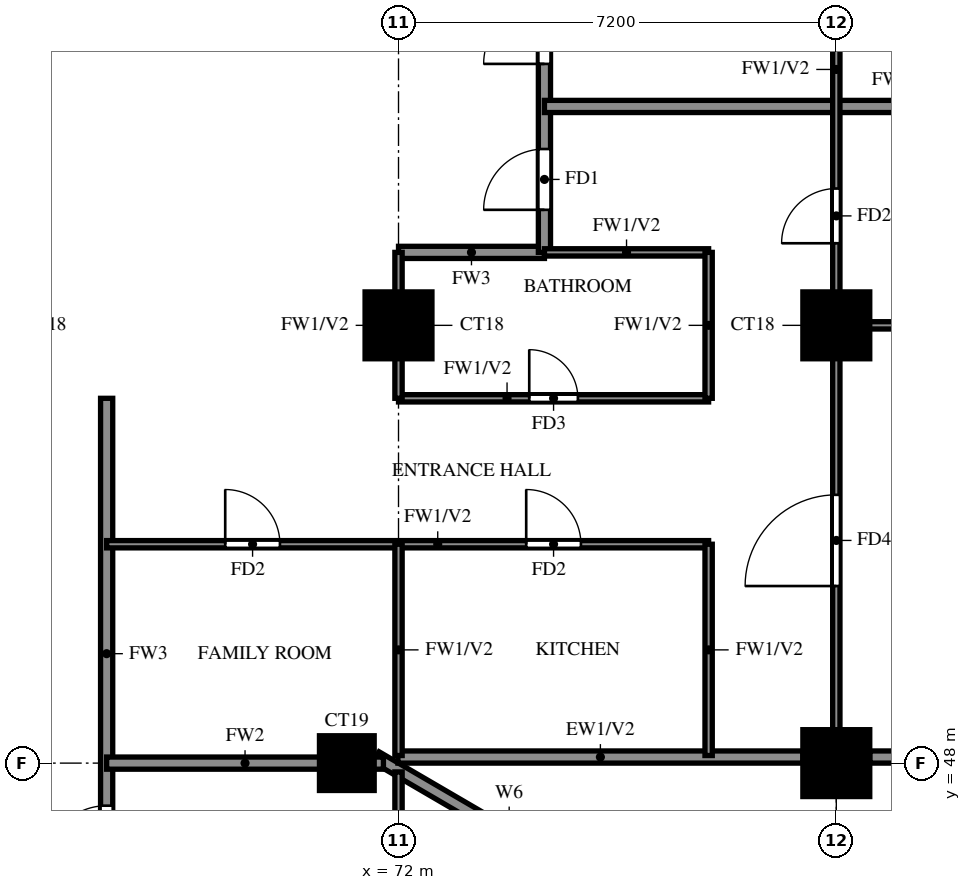
"""IFC4 building model, lengths in metres.
Left out: names, types, materials, properties, quantities, classifications, styles, units other than length and angle.
Written with IfcOpenShell. Run it as: python <this file> out.ifc"""

import sys

from ifc_helpers import new_model, si_unit, direction, frame, frame_2d, origin, origin_2d, place, context, subcontext, project, spatial, rectangle, extrude, source, transform, mapped, element, fill, save


model = new_model("IFC4")
c1 = context("Model", 3, precision=1e-05, world=origin(), true_north=direction((0.0, 1.0)))
c2 = subcontext(c1, "Body", "Model", "MODEL_VIEW")
j1 = project(units=[si_unit("LENGTHUNIT", "METRE"), si_unit("PLANEANGLEUNIT", "RADIAN")], contexts=[c1])
p1 = place(None, origin())
s1 = spatial("IfcSite", under=j1, at=p1, CompositionType="ELEMENT")
p2 = place(p1, origin())
s2 = spatial("IfcBuilding", under=s1, at=p2, CompositionType="ELEMENT")
p3 = place(p2, frame((0.0, 0.0, 127.0)))
s3 = spatial("IfcBuildingStorey", under=s2, at=p3, CompositionType="ELEMENT", Elevation=127.0)
m1 = source(origin(), c2, "Body", "SweptSolid", [
    extrude(rectangle(XDim=0.9, YDim=0.9, at=origin_2d()), origin(), (0.0, 0.0, 1.0), 3.2),
])
p4 = place(p3, frame((71.15, 48.0, 0.0), z_axis=(0.0, 0.0, 1.0), x_axis=(1.0, 0.0, 0.0)))
e1 = element("IfcColumn", 1, at=p4, inside=s3, PredefinedType="COLUMN", context=c2, shape_type="MappedRepresentation", body=[
    mapped(m1, transform((0.0, 0.0, 0.0))),
])
m2 = source(origin(), c2, "Body", "SweptSolid", [
    extrude(rectangle(XDim=1.1, YDim=1.1, at=origin_2d()), origin(), (0.0, 0.0, 1.0), 3.2),
])
for number, where, z_axis, x_axis in (
    (2, (79.2, 48.0, 0.0), (0.0, 0.0, 1.0), (1.0, 0.0, 0.0)),
    (3, (72.0, 55.2, 0.0), (0.0, 0.0, 1.0), (1.0, 0.0, 0.0)),
    (4, (79.2, 55.2, 0.0), (0.0, 0.0, 1.0), (1.0, 0.0, 0.0)),
):
    element("IfcColumn", number, at=place(p3, frame(where, z_axis=z_axis, x_axis=x_axis)), inside=s3, PredefinedType="COLUMN", context=c2, shape_type="MappedRepresentation", body=[
        mapped(m2, transform((0.0, 0.0, 0.0))),
    ])
p5 = place(p3, frame((85.719, 39.881, 0.0), z_axis=(0.0, 0.0, 1.0), x_axis=(-0.86377618652, 0.503875678716, 0.0)))
e5 = element("IfcWall", 5, at=p5, inside=s3, PredefinedType="SOLIDWALL", context=c2, shape_type="SweptSolid", body=[
    extrude(rectangle(XDim=16.311, YDim=0.2, at=frame_2d((8.156, 0.0))), origin(), (0.0, 0.0, 1.0), 3.2),
])
p6 = place(p5, frame((13.326, 0.0, 1.5)))
e6 = element("IfcOpeningElement", 6, at=p6, cuts=e5, PredefinedType="OPENING", context=c2, shape_type="SweptSolid", body=[
    extrude(rectangle(XDim=0.9, YDim=0.9, at=frame_2d((0.45, 0.45))), frame((0.0, 0.11, 0.0), z_axis=(0.0, -1.0, 0.0), x_axis=(1.0, 0.0, 0.0)), (0.0, 0.0, 1.0), 0.22),
])
p7 = place(p3, frame((71.99, 48.1, 0.0), z_axis=(0.0, 0.0, 1.0), x_axis=(1.0, 0.0, 0.0)))
e7 = element("IfcWall", 7, at=p7, inside=s3, PredefinedType="SOLIDWALL", context=c2, shape_type="SweptSolid", body=[
    extrude(rectangle(XDim=6.66, YDim=0.2, at=frame_2d((3.33, 0.0))), origin(), (0.0, 0.0, 1.0), 3.2),
])
p8 = place(p3, frame((79.75, 48.1, 0.0), z_axis=(0.0, 0.0, 1.0), x_axis=(1.0, 0.0, 0.0)))
e8 = element("IfcWall", 8, at=p8, inside=s3, PredefinedType="SOLIDWALL", context=c2, shape_type="SweptSolid", body=[
    extrude(rectangle(XDim=5.6, YDim=0.2, at=frame_2d((2.8, 0.0))), origin(), (0.0, 0.0, 1.0), 3.2),
])
p9 = place(p8, frame((1.6, 0.0, 0.6)))
e9 = element("IfcOpeningElement", 9, at=p9, cuts=e8, PredefinedType="OPENING", context=c2, shape_type="SweptSolid", body=[
    extrude(rectangle(XDim=2.4, YDim=2.4, at=frame_2d((1.2, 1.2))), frame((0.0, 0.11, 0.0), z_axis=(0.0, -1.0, 0.0), x_axis=(1.0, 0.0, 0.0)), (0.0, 0.0, 1.0), 0.22),
])
p10 = place(p3, frame((72.0, 56.4, 0.0), z_axis=(0.0, 0.0, 1.0), x_axis=(1.0, 0.0, 0.0)))
e10 = element("IfcWall", 10, at=p10, inside=s3, PredefinedType="SOLIDWALL", context=c2, shape_type="SweptSolid", body=[
    extrude(rectangle(XDim=2.4, YDim=0.2, at=frame_2d((1.2, 0.0))), origin(), (0.0, 0.0, 1.0), 3.2),
])
p11 = place(p3, frame((67.2, 45.6, 0.0), z_axis=(0.0, 0.0, 1.0), x_axis=(0.0, 1.0, 0.0)))
e11 = element("IfcWall", 11, at=p11, inside=s3, PredefinedType="SOLIDWALL", context=c2, shape_type="SweptSolid", body=[
    extrude(rectangle(XDim=8.4, YDim=0.2, at=frame_2d((4.2, 0.0))), origin(), (0.0, 0.0, 1.0), 3.2),
])
p12 = place(p11, frame((0.7, 0.0, 0.0)))
e12 = element("IfcOpeningElement", 12, at=p12, cuts=e11, PredefinedType="OPENING", context=c2, shape_type="SweptSolid", body=[
    extrude(rectangle(XDim=1.0, YDim=2.1, at=frame_2d((0.5, 1.05))), frame((0.0, 0.11, 0.0), z_axis=(0.0, -1.0, 0.0), x_axis=(1.0, 0.0, 0.0)), (0.0, 0.0, 1.0), 0.22),
])
p13 = place(p3, frame((74.4, 56.4, 0.0), z_axis=(0.0, 0.0, 1.0), x_axis=(0.0, 1.0, 0.0)))
e13 = element("IfcWall", 13, at=p13, inside=s3, PredefinedType="SOLIDWALL", context=c2, shape_type="SweptSolid", body=[
    extrude(rectangle(XDim=9.6, YDim=0.2, at=frame_2d((4.8, 0.0))), origin(), (0.0, 0.0, 1.0), 3.2),
])
p14 = place(p13, frame((0.7, 0.0, 0.0)))
e14 = element("IfcOpeningElement", 14, at=p14, cuts=e13, PredefinedType="OPENING", context=c2, shape_type="SweptSolid", body=[
    extrude(rectangle(XDim=1.0, YDim=2.1, at=frame_2d((0.5, 1.05))), frame((0.0, 0.11, 0.0), z_axis=(0.0, -1.0, 0.0), x_axis=(1.0, 0.0, 0.0)), (0.0, 0.0, 1.0), 0.22),
])
p15 = place(p13, frame((3.1, 0.0, 0.0)))
e15 = element("IfcOpeningElement", 15, at=p15, cuts=e13, PredefinedType="OPENING", context=c2, shape_type="SweptSolid", body=[
    extrude(rectangle(XDim=1.0, YDim=2.1, at=frame_2d((0.5, 1.05))), frame((0.0, 0.11, 0.0), z_axis=(0.0, -1.0, 0.0), x_axis=(1.0, 0.0, 0.0)), (0.0, 0.0, 1.0), 0.22),
])
p16 = place(p3, frame((67.2, 48.0, 0.0), z_axis=(0.0, 0.0, 1.0), x_axis=(1.0, 0.0, 0.0)))
e16 = element("IfcWall", 16, at=p16, inside=s3, PredefinedType="SOLIDWALL", context=c2, shape_type="SweptSolid", body=[
    extrude(rectangle(XDim=4.552, YDim=0.2, at=frame_2d((2.276, 0.0))), origin(), (0.0, 0.0, 1.0), 3.2),
])
p17 = place(p3, frame((74.4, 58.8, 0.0), z_axis=(0.0, 0.0, 1.0), x_axis=(1.0, 0.0, 0.0)))
e17 = element("IfcWall", 17, at=p17, inside=s3, PredefinedType="SOLIDWALL", context=c2, shape_type="SweptSolid", body=[
    extrude(rectangle(XDim=11.875, YDim=0.2, at=frame_2d((5.938, 0.0))), origin(), (0.0, 0.0, 1.0), 2.3),
])
p18 = place(p3, frame((67.2, 51.6, 0.0), z_axis=(0.0, 0.0, 1.0), x_axis=(1.0, 0.0, 0.0)))
e18 = element("IfcWall", 18, at=p18, inside=s3, PredefinedType="PARTITIONING", context=c2, shape_type="SweptSolid", body=[
    extrude(rectangle(XDim=9.9, YDim=0.12, at=frame_2d((4.95, 0.0))), origin(), (0.0, 0.0, 1.0), 3.2),
])
p19 = place(p18, frame((6.9, 0.0, 0.0)))
e19 = element("IfcOpeningElement", 19, at=p19, cuts=e18, PredefinedType="OPENING", context=c2, shape_type="SweptSolid", body=[
    extrude(rectangle(XDim=0.9, YDim=2.1, at=frame_2d((0.45, 1.05))), frame((0.0, 0.07, 0.0), z_axis=(0.0, -1.0, 0.0), x_axis=(1.0, 0.0, 0.0)), (0.0, 0.0, 1.0), 0.14),
])
p20 = place(p18, frame((1.95, 0.0, 0.0)))
e20 = element("IfcOpeningElement", 20, at=p20, cuts=e18, PredefinedType="OPENING", context=c2, shape_type="SweptSolid", body=[
    extrude(rectangle(XDim=0.9, YDim=2.1, at=frame_2d((0.45, 1.05))), frame((0.0, 0.07, 0.0), z_axis=(0.0, -1.0, 0.0), x_axis=(1.0, 0.0, 0.0)), (0.0, 0.0, 1.0), 0.14),
])
p21 = place(p3, frame((72.0, 54.0, 0.0), z_axis=(0.0, 0.0, 1.0), x_axis=(1.0, 0.0, 0.0)))
e21 = element("IfcWall", 21, at=p21, inside=s3, PredefinedType="PARTITIONING", context=c2, shape_type="SweptSolid", body=[
    extrude(rectangle(XDim=5.1, YDim=0.12, at=frame_2d((2.55, 0.0))), origin(), (0.0, 0.0, 1.0), 3.2),
])
p22 = place(p21, frame((2.15, 0.0, 0.0)))
e22 = element("IfcOpeningElement", 22, at=p22, cuts=e21, PredefinedType="OPENING", context=c2, shape_type="SweptSolid", body=[
    extrude(rectangle(XDim=0.8, YDim=2.1, at=frame_2d((0.4, 1.05))), frame((0.0, 0.07, 0.0), z_axis=(0.0, -1.0, 0.0), x_axis=(1.0, 0.0, 0.0)), (0.0, 0.0, 1.0), 0.14),
])
p23 = place(p3, frame((79.2, 55.2, 0.0), z_axis=(0.0, 0.0, 1.0), x_axis=(1.0, 0.0, 0.0)))
e23 = element("IfcWall", 23, at=p23, inside=s3, PredefinedType="PARTITIONING", context=c2, shape_type="SweptSolid", body=[
    extrude(rectangle(XDim=7.075, YDim=0.12, at=frame_2d((3.538, 0.0))), origin(), (0.0, 0.0, 1.0), 3.2),
])
p24 = place(p3, frame((74.4, 56.4, 0.0), z_axis=(0.0, 0.0, 1.0), x_axis=(1.0, 0.0, 0.0)))
e24 = element("IfcWall", 24, at=p24, inside=s3, PredefinedType="PARTITIONING", context=c2, shape_type="SweptSolid", body=[
    extrude(rectangle(XDim=2.7, YDim=0.12, at=frame_2d((1.35, 0.0))), origin(), (0.0, 0.0, 1.0), 3.2),
])
p25 = place(p3, frame((72.0, 39.725, 0.0), z_axis=(0.0, 0.0, 1.0), x_axis=(0.0, 1.0, 0.0)))
e25 = element("IfcWall", 25, at=p25, inside=s3, PredefinedType="PARTITIONING", context=c2, shape_type="SweptSolid", body=[
    extrude(rectangle(XDim=8.13, YDim=0.12, at=frame_2d((4.065, 0.0))), origin(), (0.0, 0.0, 1.0), 2.3),
])
p26 = place(p25, frame((1.788, 0.0, 0.0)))
e26 = element("IfcOpeningElement", 26, at=p26, cuts=e25, PredefinedType="OPENING", context=c2, shape_type="SweptSolid", body=[
    extrude(rectangle(XDim=0.9, YDim=2.1, at=frame_2d((0.45, 1.05))), frame((0.0, 0.07, 0.0), z_axis=(0.0, -1.0, 0.0), x_axis=(1.0, 0.0, 0.0)), (0.0, 0.0, 1.0), 0.14),
])
p27 = place(p25, frame((4.575, 0.0, 0.0)))
e27 = element("IfcOpeningElement", 27, at=p27, cuts=e25, PredefinedType="OPENING", context=c2, shape_type="SweptSolid", body=[
    extrude(rectangle(XDim=0.8, YDim=2.1, at=frame_2d((0.4, 1.05))), frame((0.0, 0.07, 0.0), z_axis=(0.0, -1.0, 0.0), x_axis=(1.0, 0.0, 0.0)), (0.0, 0.0, 1.0), 0.14),
])
p28 = place(p3, frame((72.0, 48.125, 0.0), z_axis=(0.0, 0.0, 1.0), x_axis=(0.0, 1.0, 0.0)))
e28 = element("IfcWall", 28, at=p28, inside=s3, PredefinedType="PARTITIONING", context=c2, shape_type="SweptSolid", body=[
    extrude(rectangle(XDim=3.475, YDim=0.12, at=frame_2d((1.738, 0.0))), origin(), (0.0, 0.0, 1.0), 3.2),
])
p29 = place(p3, frame((72.0, 54.0, 0.0), z_axis=(0.0, 0.0, 1.0), x_axis=(0.0, 1.0, 0.0)))
e29 = element("IfcWall", 29, at=p29, inside=s3, PredefinedType="PARTITIONING", context=c2, shape_type="SweptSolid", body=[
    extrude(rectangle(XDim=2.4, YDim=0.12, at=frame_2d((1.2, 0.0))), origin(), (0.0, 0.0, 1.0), 3.2),
])
p30 = place(p3, frame((77.1, 48.125, 0.0), z_axis=(0.0, 0.0, 1.0), x_axis=(0.0, 1.0, 0.0)))
e30 = element("IfcWall", 30, at=p30, inside=s3, PredefinedType="PARTITIONING", context=c2, shape_type="SweptSolid", body=[
    extrude(rectangle(XDim=3.475, YDim=0.12, at=frame_2d((1.738, 0.0))), origin(), (0.0, 0.0, 1.0), 3.2),
])
p31 = place(p3, frame((77.1, 54.0, 0.0), z_axis=(0.0, 0.0, 1.0), x_axis=(0.0, 1.0, 0.0)))
e31 = element("IfcWall", 31, at=p31, inside=s3, PredefinedType="PARTITIONING", context=c2, shape_type="SweptSolid", body=[
    extrude(rectangle(XDim=2.4, YDim=0.12, at=frame_2d((1.2, 0.0))), origin(), (0.0, 0.0, 1.0), 3.2),
])
p32 = place(p3, frame((79.2, 48.125, 0.0), z_axis=(0.0, 0.0, 1.0), x_axis=(0.0, 1.0, 0.0)))
e32 = element("IfcWall", 32, at=p32, inside=s3, PredefinedType="PARTITIONING", context=c2, shape_type="SweptSolid", body=[
    extrude(rectangle(XDim=25.075, YDim=0.12, at=frame_2d((12.538, 0.0))), origin(), (0.0, 0.0, 1.0), 3.2),
])
p33 = place(p32, frame((2.788, 0.0, 0.0)))
e33 = element("IfcOpeningElement", 33, at=p33, cuts=e32, PredefinedType="OPENING", context=c2, shape_type="SweptSolid", body=[
    extrude(rectangle(XDim=1.5, YDim=2.1, at=frame_2d((0.75, 1.05))), frame((0.0, 0.07, 0.0), z_axis=(0.0, -1.0, 0.0), x_axis=(1.0, 0.0, 0.0)), (0.0, 0.0, 1.0), 0.14),
])
p34 = place(p32, frame((8.425, 0.0, 0.0)))
e34 = element("IfcOpeningElement", 34, at=p34, cuts=e32, PredefinedType="OPENING", context=c2, shape_type="SweptSolid", body=[
    extrude(rectangle(XDim=0.9, YDim=2.1, at=frame_2d((0.45, 1.05))), frame((0.0, 0.07, 0.0), z_axis=(0.0, -1.0, 0.0), x_axis=(1.0, 0.0, 0.0)), (0.0, 0.0, 1.0), 0.14),
])
p35 = place(p32, frame((12.025, 0.0, 0.0)))
e35 = element("IfcOpeningElement", 35, at=p35, cuts=e32, PredefinedType="OPENING", context=c2, shape_type="SweptSolid", body=[
    extrude(rectangle(XDim=0.9, YDim=2.1, at=frame_2d((0.45, 1.05))), frame((0.0, 0.07, 0.0), z_axis=(0.0, -1.0, 0.0), x_axis=(1.0, 0.0, 0.0)), (0.0, 0.0, 1.0), 0.14),
])
p36 = place(p32, frame((15.625, 0.0, 0.0)))
e36 = element("IfcOpeningElement", 36, at=p36, cuts=e32, PredefinedType="OPENING", context=c2, shape_type="SweptSolid", body=[
    extrude(rectangle(XDim=0.9, YDim=2.1, at=frame_2d((0.45, 1.05))), frame((0.0, 0.07, 0.0), z_axis=(0.0, -1.0, 0.0), x_axis=(1.0, 0.0, 0.0)), (0.0, 0.0, 1.0), 0.14),
])
p37 = place(p32, frame((19.225, 0.0, 0.0)))
e37 = element("IfcOpeningElement", 37, at=p37, cuts=e32, PredefinedType="OPENING", context=c2, shape_type="SweptSolid", body=[
    extrude(rectangle(XDim=0.9, YDim=2.1, at=frame_2d((0.45, 1.05))), frame((0.0, 0.07, 0.0), z_axis=(0.0, -1.0, 0.0), x_axis=(1.0, 0.0, 0.0)), (0.0, 0.0, 1.0), 0.14),
])
p38 = place(p32, frame((22.825, 0.0, 0.0)))
e38 = element("IfcOpeningElement", 38, at=p38, cuts=e32, PredefinedType="OPENING", context=c2, shape_type="SweptSolid", body=[
    extrude(rectangle(XDim=0.9, YDim=2.1, at=frame_2d((0.45, 1.05))), frame((0.0, 0.07, 0.0), z_axis=(0.0, -1.0, 0.0), x_axis=(1.0, 0.0, 0.0)), (0.0, 0.0, 1.0), 0.14),
])
p39 = place(p14, origin())
e39 = element("IfcDoor", 39, at=p39, inside=s3, OperationType="SINGLE_SWING_RIGHT", PredefinedType="DOOR", context=c2, shape_type="SweptSolid", body=[
    extrude(rectangle(XDim=1.0, YDim=2.1, at=frame_2d((0.5, 1.05))), frame((0.0, 0.025, 0.0), z_axis=(0.0, -1.0, 0.0), x_axis=(1.0, 0.0, 0.0)), (0.0, 0.0, 1.0), 0.05),
])
fill(e14, e39)
p40 = place(p33, origin())
e40 = element("IfcDoor", 40, at=p40, inside=s3, OperationType="SINGLE_SWING_LEFT", PredefinedType="DOOR", context=c2, shape_type="SweptSolid", body=[
    extrude(rectangle(XDim=1.5, YDim=2.1, at=frame_2d((0.75, 1.05))), frame((0.0, 0.025, 0.0), z_axis=(0.0, -1.0, 0.0), x_axis=(1.0, 0.0, 0.0)), (0.0, 0.0, 1.0), 0.05),
])
fill(e33, e40)
p41 = place(p34, origin())
e41 = element("IfcDoor", 41, at=p41, inside=s3, OperationType="SINGLE_SWING_LEFT", PredefinedType="DOOR", context=c2, shape_type="SweptSolid", body=[
    extrude(rectangle(XDim=0.9, YDim=2.1, at=frame_2d((0.45, 1.05))), frame((0.0, 0.025, 0.0), z_axis=(0.0, -1.0, 0.0), x_axis=(1.0, 0.0, 0.0)), (0.0, 0.0, 1.0), 0.05),
])
fill(e34, e41)
p42 = place(p19, origin())
e42 = element("IfcDoor", 42, at=p42, inside=s3, OperationType="SINGLE_SWING_RIGHT", PredefinedType="DOOR", context=c2, shape_type="SweptSolid", body=[
    extrude(rectangle(XDim=0.9, YDim=2.1, at=frame_2d((0.45, 1.05))), frame((0.0, 0.025, 0.0), z_axis=(0.0, -1.0, 0.0), x_axis=(1.0, 0.0, 0.0)), (0.0, 0.0, 1.0), 0.05),
])
fill(e19, e42)
p43 = place(p22, origin())
e43 = element("IfcDoor", 43, at=p43, inside=s3, OperationType="SINGLE_SWING_LEFT", PredefinedType="DOOR", context=c2, shape_type="SweptSolid", body=[
    extrude(rectangle(XDim=0.8, YDim=2.1, at=frame_2d((0.4, 1.05))), frame((0.0, 0.025, 0.0), z_axis=(0.0, -1.0, 0.0), x_axis=(1.0, 0.0, 0.0)), (0.0, 0.0, 1.0), 0.05),
])
fill(e22, e43)
p44 = place(p20, origin())
e44 = element("IfcDoor", 44, at=p44, inside=s3, OperationType="SINGLE_SWING_LEFT", PredefinedType="DOOR", context=c2, shape_type="SweptSolid", body=[
    extrude(rectangle(XDim=0.9, YDim=2.1, at=frame_2d((0.45, 1.05))), frame((0.0, 0.025, 0.0), z_axis=(0.0, -1.0, 0.0), x_axis=(1.0, 0.0, 0.0)), (0.0, 0.0, 1.0), 0.05),
])
fill(e20, e44)
p45 = place(p15, origin())
e45 = element("IfcDoor", 45, at=p45, inside=s3, OperationType="SINGLE_SWING_LEFT", PredefinedType="DOOR", context=c2, shape_type="SweptSolid", body=[
    extrude(rectangle(XDim=1.0, YDim=2.1, at=frame_2d((0.5, 1.05))), frame((0.0, 0.025, 0.0), z_axis=(0.0, -1.0, 0.0), x_axis=(1.0, 0.0, 0.0)), (0.0, 0.0, 1.0), 0.05),
])
fill(e15, e45)
p46 = place(p12, origin())
e46 = element("IfcDoor", 46, at=p46, inside=s3, OperationType="SINGLE_SWING_RIGHT", PredefinedType="DOOR", context=c2, shape_type="SweptSolid", body=[
    extrude(rectangle(XDim=1.0, YDim=2.1, at=frame_2d((0.5, 1.05))), frame((0.0, 0.025, 0.0), z_axis=(0.0, -1.0, 0.0), x_axis=(1.0, 0.0, 0.0)), (0.0, 0.0, 1.0), 0.05),
])
fill(e12, e46)
save(model, sys.argv[1])
